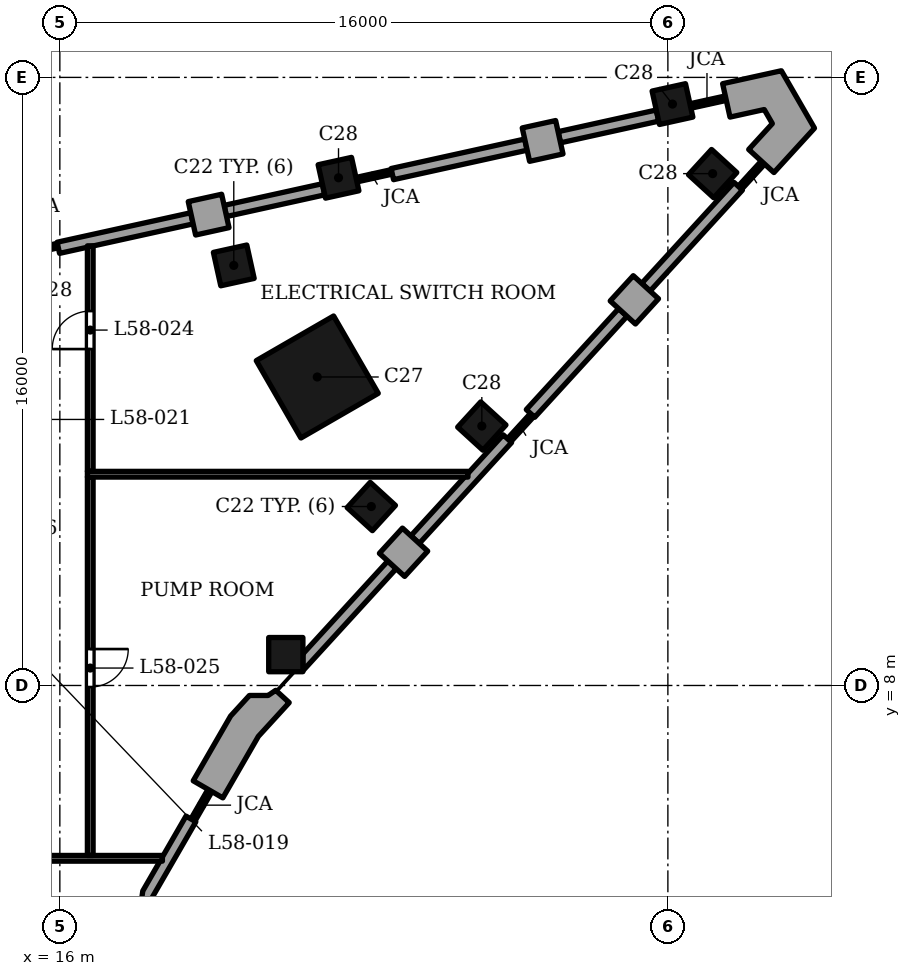
"""IFC4 building model, lengths in metres.
Left out: names, types, materials, properties, quantities, classifications, styles, units other than length and angle.
Written with IfcOpenShell. Run it as: python <this file> out.ifc"""

import sys

from ifc_helpers import new_model, si_unit, direction, frame, frame_2d, origin, origin_2d, place, context, subcontext, project, spatial, polyline, rectangle, outline, extrude, clip, halfspace, element, fill, save


model = new_model("IFC4")
c1 = context("Model", 3, precision=1e-05, world=origin(), true_north=direction((0.0, 1.0)))
c2 = subcontext(c1, "Body", "Model", "MODEL_VIEW")
j1 = project(units=[si_unit("LENGTHUNIT", "METRE"), si_unit("PLANEANGLEUNIT", "RADIAN")], contexts=[c1])
p1 = place(None, origin())
s1 = spatial("IfcSite", under=j1, at=p1, CompositionType="ELEMENT")
p2 = place(p1, origin())
s2 = spatial("IfcBuilding", under=s1, at=p2, CompositionType="ELEMENT")
p3 = place(p2, frame((0.0, 0.0, 243.2)))
s3 = spatial("IfcBuildingStorey", under=s2, at=p3, CompositionType="ELEMENT", Elevation=243.2)
for number, where, z_axis, x_axis in (
    (1, (24.196, 12.709, 0.0), (0.0, 0.0, 1.0), (0.675, 0.738, 0.0)),
    (2, (20.577, 19.053, 0.0), (0.0, 0.0, 1.0), (-0.977, -0.215, 0.0)),
):
    element("IfcColumn", number, at=place(p3, frame(where, z_axis=z_axis, x_axis=x_axis)), inside=s3, PredefinedType="COLUMN", context=c2, shape_type="SweptSolid", body=[
        extrude(rectangle(XDim=0.9, YDim=0.9, at=origin_2d()), origin(), (0.0, 0.0, 1.0), 5.0),
    ])
p4 = place(p3, frame((22.774, 16.117, 0.0), z_axis=(0.0, 0.0, 1.0), x_axis=(-0.866025412511, -0.499999984885, 0.0)))
e3 = element("IfcColumn", 3, at=p4, inside=s3, PredefinedType="COLUMN", context=c2, shape_type="SweptSolid", body=[
    extrude(rectangle(XDim=2.35, YDim=2.35, at=origin_2d()), origin(), (0.0, 0.0, 1.0), 5.0),
])
for number, where, z_axis, x_axis in (
    (4, (27.104, 14.826, 0.0), (0.0, 0.0, 1.0), (0.675, 0.738, 0.0)),
    (5, (33.178, 21.468, 0.0), (0.0, 0.0, 1.0), (0.675, 0.738, 0.0)),
    (6, (32.121, 23.298, 0.0), (0.0, 0.0, 1.0), (-0.977, -0.215, 0.0)),
    (7, (23.333, 21.359, 0.0), (0.0, 0.0, 1.0), (-0.977, -0.215, 0.0)),
):
    element("IfcColumn", number, at=place(p3, frame(where, z_axis=z_axis, x_axis=x_axis)), inside=s3, PredefinedType="COLUMN", context=c2, shape_type="SweptSolid", body=[
        extrude(rectangle(XDim=0.9, YDim=0.9, at=origin_2d()), origin(), (0.0, 0.0, 1.0), 5.0),
    ])
p5 = place(p3, frame((17.446, 1.018, 0.0), z_axis=(0.057739136959, 0.408310892257, 0.911015042317), x_axis=(-0.990149137671, 0.140016731746, 0.0)))
e8 = element("IfcColumn", 8, at=p5, inside=s3, PredefinedType="COLUMN", context=c2, shape_type="Clipping", body=[
    clip(clip(extrude(rectangle(XDim=0.9, YDim=0.9, at=origin_2d()), origin(), (0.0, 0.0, 1.0), 5.488), halfspace(frame((0.0, 0.0, 0.208), z_axis=(0.0, 0.0, 1.0), x_axis=(1.0, 0.0, 0.0)), True)), halfspace(frame((0.0, 0.0, 5.28), z_axis=(0.0, 0.0, 1.0), x_axis=(1.0, 0.0, 0.0)), False)),
])
p6 = place(p3, frame((21.946, 8.812, 0.0), z_axis=(-0.178672492864, -0.122038842511, 0.976310740089), x_axis=(0.564020277676, -0.825760937784, 0.0)))
e9 = element("IfcColumn", 9, at=p6, inside=s3, PredefinedType="COLUMN", context=c2, shape_type="Clipping", body=[
    clip(clip(extrude(rectangle(XDim=0.9, YDim=0.9, at=origin_2d()), origin(), (0.0, 0.0, 1.0), 5.121), halfspace(frame((0.0, 0.0, 0.104), z_axis=(0.0, 0.0, 1.0), x_axis=(1.0, 0.0, 0.0)), True)), halfspace(frame((0.0, 0.0, 5.017), z_axis=(0.0, 0.0, 1.0), x_axis=(1.0, 0.0, 0.0)), False)),
])
p7 = place(p3, origin())
e10 = element("IfcWall", 10, at=p7, inside=s3, PredefinedType="ELEMENTEDWALL", context=c2, shape_type="SweptSolid", body=[
    extrude(outline(polyline([(19.32, 4.563), (18.183, 2.594), (18.07, 1.799), (19.579, 4.413), (19.32, 4.563)])), origin(), (0.0, 0.0, 1.0), 3.5),
])
p8 = place(p3, frame((24.74, 11.173, 0.0), z_axis=(0.0, 0.0, 1.0), x_axis=(0.674802966049, 0.737997938352, 0.0)))
e11 = element("IfcWall", 11, at=p8, inside=s3, PredefinedType="SOLIDWALL", context=c2, shape_type="SweptSolid", body=[
    extrude(rectangle(XDim=0.9, YDim=0.9, at=frame_2d((0.45, 0.0))), origin(), (0.0, 0.0, 1.0), 3.5),
])
p9 = place(p3, frame((31.422, 18.479, 0.0), z_axis=(0.0, 0.0, 1.0), x_axis=(-0.674938051731, -0.737874397391, 0.0)))
e12 = element("IfcWall", 12, at=p9, inside=s3, PredefinedType="SOLIDWALL", context=c2, shape_type="SweptSolid", body=[
    extrude(rectangle(XDim=0.9, YDim=0.9, at=frame_2d((0.45, 0.0))), origin(), (0.0, 0.0, 1.0), 3.5),
])
p10 = place(p3, origin())
e13 = element("IfcWall", 13, at=p10, inside=s3, PredefinedType="ELEMENTEDWALL", context=c2, shape_type="SweptSolid", body=[
    extrude(outline(polyline([(24.63, 11.275), (22.396, 8.832), (22.396, 8.439), (22.422, 8.416), (24.851, 11.072), (24.63, 11.275)])), origin(), (0.0, 0.0, 1.0), 3.5),
])
p11 = place(p3, frame((25.348, 11.838, 0.0), z_axis=(0.0, 0.0, 1.0), x_axis=(0.674867348758, 0.737939063595, 0.0)))
e14 = element("IfcWall", 14, at=p11, inside=s3, PredefinedType="ELEMENTEDWALL", context=c2, shape_type="SweptSolid", body=[
    extrude(rectangle(XDim=3.6, YDim=0.3, at=frame_2d((1.8, 0.0))), origin(), (0.0, 0.0, 1.0), 3.5),
])
for number, where, z_axis, x_axis in (
    (15, (28.385, 15.158, 0.0), (0.0, 0.0, 1.0), (0.675, 0.738, 0.0)),
    (16, (31.422, 18.479, 0.0), (0.0, 0.0, 1.0), (0.675, 0.738, 0.0)),
):
    element("IfcWall", number, at=place(p3, frame(where, z_axis=z_axis, x_axis=x_axis)), inside=s3, PredefinedType="ELEMENTEDWALL", context=c2, shape_type="SweptSolid", body=[
        extrude(rectangle(XDim=3.6, YDim=0.3, at=frame_2d((1.8, 0.0))), origin(), (0.0, 0.0, 1.0), 3.5),
    ])
p12 = place(p3, frame((28.801, 21.889, 0.0), z_axis=(0.0, 0.0, 1.0), x_axis=(-0.215436290857, 0.976517897727, 0.0)))
e17 = element("IfcWall", 17, at=p12, inside=s3, PredefinedType="SOLIDWALL", context=c2, shape_type="SweptSolid", body=[
    extrude(rectangle(XDim=0.9, YDim=0.9, at=frame_2d((0.45, 0.0))), origin(), (0.0, 0.0, 1.0), 3.5),
])
p13 = place(p3, frame((19.476, 20.292, 0.0), z_axis=(0.0, 0.0, 1.0), x_axis=(0.976473402733, 0.215637876437, 0.0)))
e18 = element("IfcWall", 18, at=p13, inside=s3, PredefinedType="SOLIDWALL", context=c2, shape_type="SweptSolid", body=[
    extrude(rectangle(XDim=0.9, YDim=0.9, at=frame_2d((0.45, 0.0))), origin(), (0.0, 0.0, 1.0), 3.5),
])
p14 = place(p3, origin())
e19 = element("IfcWall", 19, at=p14, inside=s3, PredefinedType="ELEMENTEDWALL", context=c2, shape_type="SweptSolid", body=[
    extrude(outline(polyline([(29.176, 22.279), (31.759, 22.849), (31.695, 23.142), (29.111, 22.572), (29.176, 22.279)])), origin(), (0.0, 0.0, 1.0), 3.5),
])
p15 = place(p3, frame((28.264, 22.231, 0.0), z_axis=(0.0, 0.0, 1.0), x_axis=(-0.976513072969, -0.215458159096, 0.0)))
e20 = element("IfcWall", 20, at=p15, inside=s3, PredefinedType="ELEMENTEDWALL", context=c2, shape_type="SweptSolid", body=[
    extrude(rectangle(XDim=3.6, YDim=0.3, at=frame_2d((1.8, 0.0))), origin(), (0.0, 0.0, 1.0), 3.5),
])
p16 = place(p3, origin())
e21 = element("IfcWall", 21, at=p16, inside=s3, PredefinedType="ELEMENTEDWALL", context=c2, shape_type="SweptSolid", body=[
    extrude(outline(polyline([(20.387, 20.34), (22.971, 20.91), (22.907, 21.203), (20.323, 20.633), (20.387, 20.34)])), origin(), (0.0, 0.0, 1.0), 3.5),
])
p17 = place(p3, frame((19.476, 20.292, 0.0), z_axis=(0.0, 0.0, 1.0), x_axis=(-0.976513072969, -0.215458159096, 0.0)))
e22 = element("IfcWall", 22, at=p17, inside=s3, PredefinedType="ELEMENTEDWALL", context=c2, shape_type="SweptSolid", body=[
    extrude(rectangle(XDim=3.6, YDim=0.3, at=frame_2d((1.8, 0.0))), origin(), (0.0, 0.0, 1.0), 3.5),
])
p18 = place(p3, origin())
e23 = element("IfcWall", 23, at=p18, inside=s3, PredefinedType="SOLIDWALL", context=c2, shape_type="SweptSolid", body=[
    extrude(outline(polyline([(19.51, 5.492), (20.289, 5.042), (21.223, 6.661), (22.036, 7.549), (21.681, 7.874), (21.481, 7.737), (20.988, 7.737), (20.493, 7.196), (19.51, 5.492)])), origin(), (0.0, 0.0, 1.0), 3.5),
])
p19 = place(p3, origin())
e24 = element("IfcWall", 24, at=p19, inside=s3, PredefinedType="SOLIDWALL", context=c2, shape_type="SweptSolid", body=[
    extrude(outline(polyline([(34.126, 22.104), (34.791, 21.496), (35.858, 22.664), (34.986, 24.175), (33.441, 23.834), (33.635, 22.955), (34.536, 23.154), (34.749, 22.785), (34.126, 22.104)])), origin(), (0.0, 0.0, 1.0), 3.5),
])
p20 = place(p3, frame((19.949, 5.234, 0.0), z_axis=(0.0, 0.0, 1.0), x_axis=(-0.499881837328, -0.866093614288, 0.0)))
e25 = element("IfcWall", 25, at=p20, inside=s3, PredefinedType="SOLIDWALL", context=c2, shape_type="SweptSolid", body=[
    extrude(rectangle(XDim=0.884, YDim=0.12, at=frame_2d((0.442, 0.0))), origin(), (0.0, 0.0, 1.0), 3.5),
])
for number, where, z_axis, x_axis in (
    (26, (27.84, 14.474, 0.0), (0.0, 0.0, 1.0), (0.675, 0.738, 0.0)),
    (27, (33.914, 21.115, 0.0), (0.0, 0.0, 1.0), (0.675, 0.738, 0.0)),
):
    element("IfcWall", number, at=place(p3, frame(where, z_axis=z_axis, x_axis=x_axis)), inside=s3, PredefinedType="SOLIDWALL", context=c2, shape_type="SweptSolid", body=[
        extrude(rectangle(XDim=0.868, YDim=0.12, at=frame_2d((0.434, 0.0))), origin(), (0.0, 0.0, 1.0), 3.5),
    ])
p21 = place(p3, frame((33.527, 23.454, 0.0), z_axis=(0.0, 0.0, 1.0), x_axis=(-0.976490420748, -0.215560799282, 0.0)))
e28 = element("IfcWall", 28, at=p21, inside=s3, PredefinedType="SOLIDWALL", context=c2, shape_type="SweptSolid", body=[
    extrude(rectangle(XDim=1.019, YDim=0.12, at=frame_2d((0.51, 0.0))), origin(), (0.0, 0.0, 1.0), 3.5),
])
p22 = place(p3, frame((24.709, 21.508, 0.0), z_axis=(0.0, 0.0, 1.0), x_axis=(-0.976499357304, -0.215520312698, 0.0)))
e29 = element("IfcWall", 29, at=p22, inside=s3, PredefinedType="SOLIDWALL", context=c2, shape_type="SweptSolid", body=[
    extrude(rectangle(XDim=0.99, YDim=0.12, at=frame_2d((0.495, 0.0))), origin(), (0.0, 0.0, 1.0), 3.5),
])
p23 = place(p3, frame((15.921, 19.569, 0.0), z_axis=(0.0, 0.0, 1.0), x_axis=(-0.976496818428, -0.215531815751, 0.0)))
e30 = element("IfcWall", 30, at=p23, inside=s3, PredefinedType="SOLIDWALL", context=c2, shape_type="SweptSolid", body=[
    extrude(rectangle(XDim=0.869, YDim=0.12, at=frame_2d((0.435, 0.0))), origin(), (0.0, 0.0, 1.0), 3.5),
])
p24 = place(p3, frame((4.495, 3.453, 0.0), z_axis=(0.0, 0.0, 1.0), x_axis=(1.0, 0.0, 0.0)))
e31 = element("IfcWall", 31, at=p24, inside=s3, PredefinedType="PARTITIONING", context=c2, shape_type="SweptSolid", body=[
    extrude(rectangle(XDim=14.203, YDim=0.15, at=frame_2d((7.102, 0.0))), origin(), (0.0, 0.0, 1.0), 3.752),
])
p25 = place(p3, frame((16.8, 3.528, 0.0), z_axis=(0.0, 0.0, 1.0), x_axis=(0.0, 1.0, 0.0)))
e32 = element("IfcWall", 32, at=p25, inside=s3, PredefinedType="PARTITIONING", context=c2, shape_type="SweptSolid", body=[
    extrude(rectangle(XDim=9.956, YDim=0.15, at=frame_2d((4.978, 0.0))), origin(), (0.0, 0.0, 1.0), 4.05),
])
p26 = place(p25, frame((4.431, 0.0, 0.0)))
e33 = element("IfcOpeningElement", 33, at=p26, cuts=e32, PredefinedType="OPENING", context=c2, shape_type="SweptSolid", body=[
    extrude(rectangle(XDim=1.0, YDim=2.1, at=frame_2d((0.5, 1.05))), frame((0.0, 0.085, 0.0), z_axis=(0.0, -1.0, 0.0), x_axis=(1.0, 0.0, 0.0)), (0.0, 0.0, 1.0), 0.17),
])
p27 = place(p3, frame((16.725, 13.559, 0.0), z_axis=(0.0, 0.0, 1.0), x_axis=(1.0, 0.0, 0.0)))
e34 = element("IfcWall", 34, at=p27, inside=s3, PredefinedType="PARTITIONING", context=c2, shape_type="SweptSolid", body=[
    extrude(rectangle(XDim=10.013, YDim=0.15, at=frame_2d((5.007, 0.0))), origin(), (0.0, 0.0, 1.0), 4.073),
])
p28 = place(p3, frame((16.8, 13.634, 0.0), z_axis=(0.0, 0.0, 1.0), x_axis=(0.0, 1.0, 0.0)))
e35 = element("IfcWall", 35, at=p28, inside=s3, PredefinedType="PARTITIONING", context=c2, shape_type="SweptSolid", body=[
    extrude(rectangle(XDim=5.935, YDim=0.15, at=frame_2d((2.967, 0.0))), origin(), (0.0, 0.0, 1.0), 4.13),
])
p29 = place(p28, frame((3.218, 0.0, 0.0)))
e36 = element("IfcOpeningElement", 36, at=p29, cuts=e35, PredefinedType="OPENING", context=c2, shape_type="SweptSolid", body=[
    extrude(rectangle(XDim=1.0, YDim=2.1, at=frame_2d((0.5, 1.05))), frame((0.0, 0.085, 0.0), z_axis=(0.0, -1.0, 0.0), x_axis=(1.0, 0.0, 0.0)), (0.0, 0.0, 1.0), 0.17),
])
p30 = place(p29, origin())
e37 = element("IfcDoor", 37, at=p30, inside=s3, OperationType="SINGLE_SWING_LEFT", PredefinedType="DOOR", context=c2, shape_type="SweptSolid", body=[
    extrude(rectangle(XDim=1.0, YDim=2.1, at=frame_2d((0.5, 1.05))), frame((0.0, 0.025, 0.0), z_axis=(0.0, -1.0, 0.0), x_axis=(1.0, 0.0, 0.0)), (0.0, 0.0, 1.0), 0.05),
])
fill(e36, e37)
p31 = place(p26, origin())
e38 = element("IfcDoor", 38, at=p31, inside=s3, OperationType="SINGLE_SWING_RIGHT", PredefinedType="DOOR", context=c2, shape_type="SweptSolid", body=[
    extrude(rectangle(XDim=1.0, YDim=2.1, at=frame_2d((0.5, 1.05))), frame((0.0, 0.025, 0.0), z_axis=(0.0, -1.0, 0.0), x_axis=(1.0, 0.0, 0.0)), (0.0, 0.0, 1.0), 0.05),
])
fill(e33, e38)
save(model, sys.argv[1])
